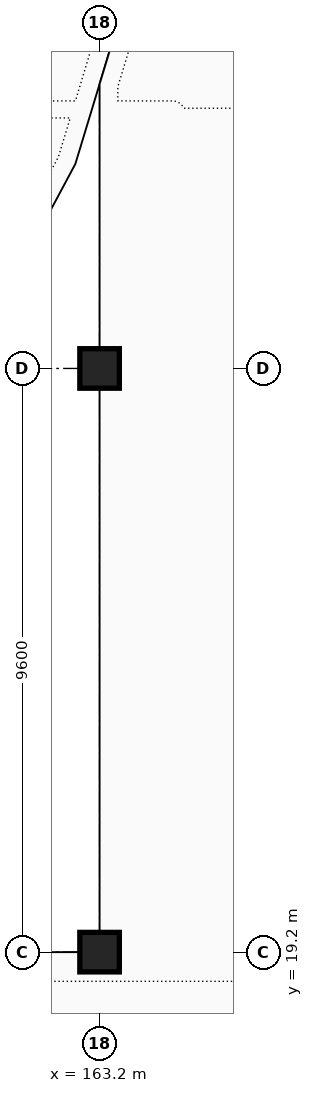
"""IFC4 building model, lengths in metres.
Left out: names, types, materials, properties, quantities, classifications, styles, units other than length and angle.
Written with IfcOpenShell. Run it as: python <this file> out.ifc"""

import sys

from ifc_helpers import new_model, si_unit, direction, frame, origin, origin_2d, place, context, subcontext, project, spatial, rectangle, extrude, element, save


model = new_model("IFC4")
c1 = context("Model", 3, precision=1e-05, world=origin(), true_north=direction((0.0, 1.0)))
c2 = subcontext(c1, "Body", "Model", "MODEL_VIEW")
j1 = project(units=[si_unit("LENGTHUNIT", "METRE"), si_unit("PLANEANGLEUNIT", "RADIAN")], contexts=[c1])
p1 = place(None, origin())
s1 = spatial("IfcSite", under=j1, at=p1, CompositionType="ELEMENT")
p2 = place(p1, origin())
s2 = spatial("IfcBuilding", under=s1, at=p2, CompositionType="ELEMENT")
p3 = place(p2, origin())
s3 = spatial("IfcBuildingStorey", under=s2, at=p3, CompositionType="ELEMENT", Elevation=0.0)
for number, where, z_axis, x_axis in (
    (1, (163.2, 19.2, 0.0), (0.0, 0.0, 1.0), (1.0, 0.0, 0.0)),
    (2, (163.2, 28.8, 0.0), (0.0, 0.0, 1.0), (1.0, 0.0, 0.0)),
):
    element("IfcColumn", number, at=place(p3, frame(where, z_axis=z_axis, x_axis=x_axis)), inside=s3, PredefinedType="COLUMN", context=c2, shape_type="SweptSolid", body=[
        extrude(rectangle(XDim=0.65, YDim=0.65, at=origin_2d()), origin(), (0.0, 0.0, 1.0), 4.8),
    ])
save(model, sys.argv[1])
